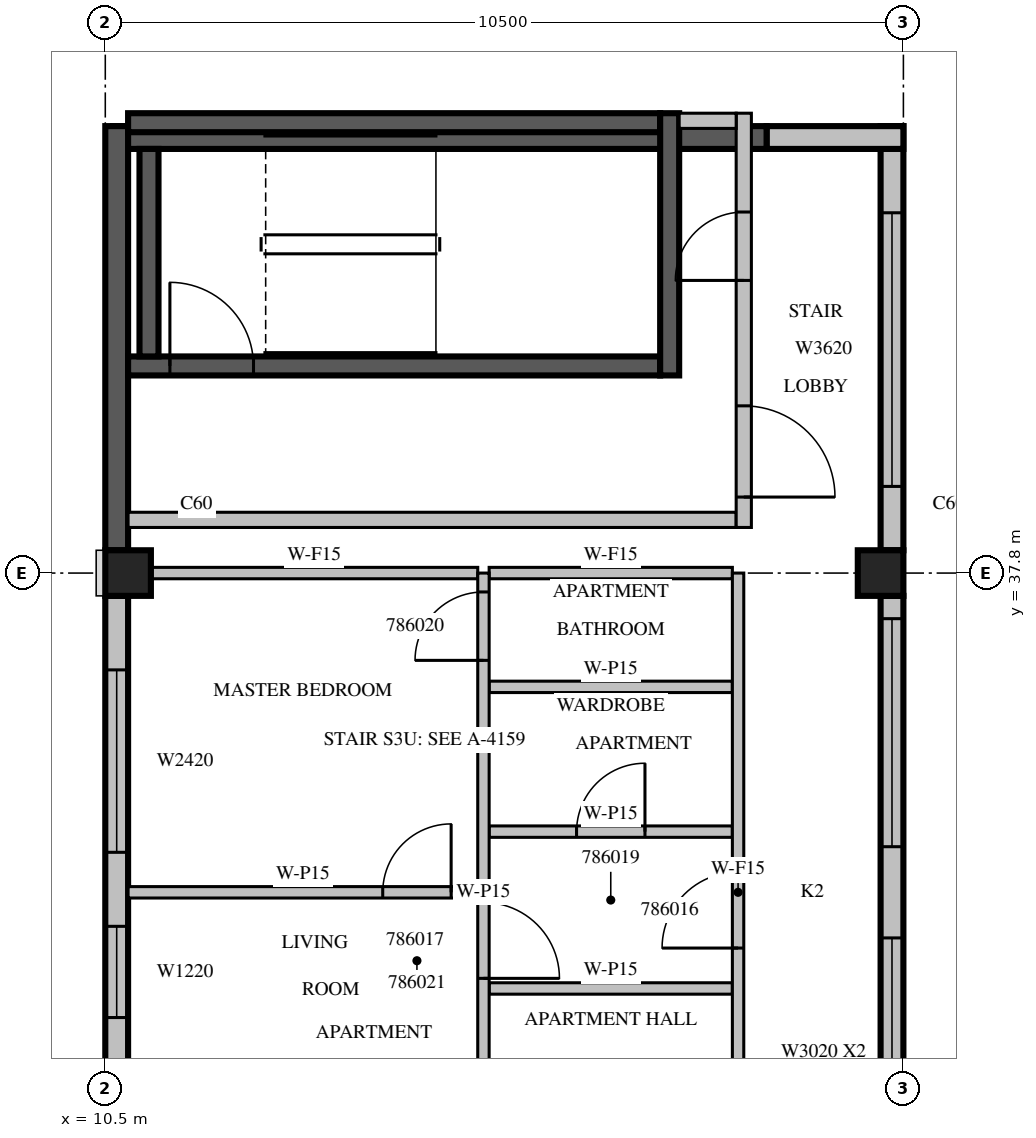
"""IFC4 building model, lengths in metres.
Left out: names, types, materials, properties, quantities, classifications, styles, units other than length and angle.
Written with IfcOpenShell. Run it as: python <this file> out.ifc"""

import sys

from ifc_helpers import new_model, si_unit, direction, frame, frame_2d, origin, origin_2d, place, context, subcontext, project, spatial, rectangle, extrude, source, transform, mapped, element, fill, save


model = new_model("IFC4")
c1 = context("Model", 3, precision=1e-05, world=origin(), true_north=direction((0.0, 1.0)))
c2 = subcontext(c1, "Body", "Model", "MODEL_VIEW")
j1 = project(units=[si_unit("LENGTHUNIT", "METRE"), si_unit("PLANEANGLEUNIT", "RADIAN")], contexts=[c1])
p1 = place(None, origin())
s1 = spatial("IfcSite", under=j1, at=p1, CompositionType="ELEMENT")
p2 = place(p1, origin())
s2 = spatial("IfcBuilding", under=s1, at=p2, CompositionType="ELEMENT")
p3 = place(p2, frame((0.0, 0.0, 361.5)))
s3 = spatial("IfcBuildingStorey", under=s2, at=p3, CompositionType="ELEMENT", Elevation=361.5)
m1 = source(origin(), c2, "Body", "SweptSolid", [
    extrude(rectangle(XDim=0.6, YDim=0.6, at=origin_2d()), origin(), (0.0, 0.0, 1.0), 3.5),
])
for number, where, z_axis, x_axis in (
    (1, (10.8, 37.8, 0.0), (0.0, 0.0, 1.0), (1.0, 0.0, 0.0)),
    (2, (20.7, 37.8, 0.0), (0.0, 0.0, 1.0), (1.0, 0.0, 0.0)),
):
    element("IfcColumn", number, at=place(p3, frame(where, z_axis=z_axis, x_axis=x_axis)), inside=s3, PredefinedType="COLUMN", context=c2, shape_type="MappedRepresentation", body=[
        mapped(m1, transform((0.0, 0.0, 0.0), scale=1.0)),
    ])
m2 = source(origin(), c2, "Body", "SweptSolid", [
    extrude(rectangle(XDim=7.8, YDim=0.3, at=frame_2d((3.9, 0.0))), origin(), (0.0, 0.0, 1.0), 3.1),
])
p4 = place(p3, frame((20.85, 29.7, 0.0), z_axis=(0.0, 0.0, 1.0), x_axis=(0.0, 1.0, 0.0)))
e3 = element("IfcWall", 3, at=p4, inside=s3, PredefinedType="STANDARD", context=c2, shape_type="MappedRepresentation", body=[
    mapped(m2, transform((0.0, 0.0, 0.0), scale=1.0)),
])
m3 = source(origin(), c2, "Body", "SweptSolid", [
    extrude(rectangle(XDim=3.0, YDim=2.0, at=frame_2d((1.5, 1.0))), frame((0.0, 0.16, 0.0), z_axis=(0.0, -1.0, 0.0), x_axis=(1.0, 0.0, 0.0)), (0.0, 0.0, 1.0), 0.32),
])
p5 = place(p4, frame((0.3, 0.0, 0.6)))
e4 = element("IfcOpeningElement", 4, at=p5, cuts=e3, PredefinedType="OPENING", context=c2, shape_type="MappedRepresentation", body=[
    mapped(m3, transform((0.0, 0.0, 0.0), scale=1.0)),
])
p6 = place(p4, frame((4.5, 0.0, 0.6)))
e5 = element("IfcOpeningElement", 5, at=p6, cuts=e3, PredefinedType="OPENING", context=c2, shape_type="MappedRepresentation", body=[
    mapped(m3, transform((0.0, 0.0, 0.0), scale=1.0)),
])
m4 = source(origin(), c2, "Body", "SweptSolid", [
    extrude(rectangle(XDim=5.58, YDim=0.3, at=frame_2d((2.79, 0.0))), origin(), (0.0, 0.0, 1.0), 3.1),
])
p7 = place(p3, frame((20.85, 38.1, 0.0), z_axis=(0.0, 0.0, 1.0), x_axis=(0.0, 1.0, 0.0)))
e6 = element("IfcWall", 6, at=p7, inside=s3, PredefinedType="STANDARD", context=c2, shape_type="MappedRepresentation", body=[
    mapped(m4, transform((0.0, 0.0, 0.0), scale=1.0)),
])
m5 = source(origin(), c2, "Body", "SweptSolid", [
    extrude(rectangle(XDim=3.6, YDim=2.0, at=frame_2d((1.8, 1.0))), frame((0.0, 0.16, 0.0), z_axis=(0.0, -1.0, 0.0), x_axis=(1.0, 0.0, 0.0)), (0.0, 0.0, 1.0), 0.32),
])
p8 = place(p7, frame((0.84, 0.0, 0.6)))
e7 = element("IfcOpeningElement", 7, at=p8, cuts=e6, PredefinedType="OPENING", context=c2, shape_type="MappedRepresentation", body=[
    mapped(m5, transform((0.0, 0.0, 0.0), scale=1.0)),
])
m6 = source(origin(), c2, "Body", "SweptSolid", [
    extrude(rectangle(XDim=1.8, YDim=0.3, at=frame_2d((0.9, 0.0))), origin(), (0.0, 0.0, 1.0), 3.1),
])
p9 = place(p3, frame((21.0, 43.53, 0.0), z_axis=(0.0, 0.0, 1.0), x_axis=(-1.0, 0.0, 0.0)))
e8 = element("IfcWall", 8, at=p9, inside=s3, PredefinedType="STANDARD", context=c2, shape_type="MappedRepresentation", body=[
    mapped(m6, transform((0.0, 0.0, 0.0), scale=1.0)),
])
m7 = source(origin(), c2, "Body", "SweptSolid", [
    extrude(rectangle(XDim=8.6, YDim=0.3, at=frame_2d((4.3, 0.0))), origin(), (0.0, 0.0, 1.0), 3.1),
])
p10 = place(p3, frame((19.2, 43.53, 0.0), z_axis=(0.0, 0.0, 1.0), x_axis=(-1.0, 0.0, 0.0)))
e9 = element("IfcWall", 9, at=p10, inside=s3, PredefinedType="SOLIDWALL", context=c2, shape_type="MappedRepresentation", body=[
    mapped(m7, transform((0.0, 0.0, 0.0), scale=1.0)),
])
m8 = source(origin(), c2, "Body", "SweptSolid", [
    extrude(rectangle(XDim=5.58, YDim=0.3, at=frame_2d((2.79, 0.0))), origin(), (0.0, 0.0, 1.0), 3.1),
])
p11 = place(p3, frame((10.65, 43.68, 0.0), z_axis=(0.0, 0.0, 1.0), x_axis=(0.0, -1.0, 0.0)))
e10 = element("IfcWall", 10, at=p11, inside=s3, PredefinedType="SOLIDWALL", context=c2, shape_type="MappedRepresentation", body=[
    mapped(m8, transform((0.0, 0.0, 0.0), scale=1.0)),
])
m9 = source(origin(), c2, "Body", "SweptSolid", [
    extrude(rectangle(XDim=6.42, YDim=0.3, at=frame_2d((3.21, 0.0))), origin(), (0.0, 0.0, 1.0), 3.1),
])
p12 = place(p3, frame((10.65, 37.5, 0.0), z_axis=(0.0, 0.0, 1.0), x_axis=(0.0, -1.0, 0.0)))
e11 = element("IfcWall", 11, at=p12, inside=s3, PredefinedType="STANDARD", context=c2, shape_type="MappedRepresentation", body=[
    mapped(m9, transform((0.0, 0.0, 0.0), scale=1.0)),
])
m10 = source(origin(), c2, "Body", "SweptSolid", [
    extrude(rectangle(XDim=1.2, YDim=2.0, at=frame_2d((0.6, 1.0))), frame((0.0, 0.16, 0.0), z_axis=(0.0, -1.0, 0.0), x_axis=(1.0, 0.0, 0.0)), (0.0, 0.0, 1.0), 0.32),
])
p13 = place(p12, frame((4.348, 0.0, 0.6)))
e12 = element("IfcOpeningElement", 12, at=p13, cuts=e11, PredefinedType="OPENING", context=c2, shape_type="MappedRepresentation", body=[
    mapped(m10, transform((0.0, 0.0, 0.0), scale=1.0)),
])
m11 = source(origin(), c2, "Body", "SweptSolid", [
    extrude(rectangle(XDim=2.4, YDim=2.0, at=frame_2d((1.2, 1.0))), frame((0.0, 0.16, 0.0), z_axis=(0.0, -1.0, 0.0), x_axis=(1.0, 0.0, 0.0)), (0.0, 0.0, 1.0), 0.32),
])
p14 = place(p12, frame((0.974, 0.0, 0.6)))
e13 = element("IfcOpeningElement", 13, at=p14, cuts=e11, PredefinedType="OPENING", context=c2, shape_type="MappedRepresentation", body=[
    mapped(m11, transform((0.0, 0.0, 0.0), scale=1.0)),
])
m12 = source(origin(), c2, "Body", "SweptSolid", [
    extrude(rectangle(XDim=7.0, YDim=0.25, at=frame_2d((3.5, 0.0))), origin(), (0.0, 0.0, 1.0), 3.1),
])
p15 = place(p3, frame((10.8, 40.525, 0.0), z_axis=(0.0, 0.0, 1.0), x_axis=(1.0, 0.0, 0.0)))
e14 = element("IfcWall", 14, at=p15, inside=s3, PredefinedType="SOLIDWALL", context=c2, shape_type="MappedRepresentation", body=[
    mapped(m12, transform((0.0, 0.0, 0.0), scale=1.0)),
])
m13 = source(origin(), c2, "Body", "SweptSolid", [
    extrude(rectangle(XDim=1.1, YDim=2.1, at=frame_2d((0.55, 1.05))), frame((0.0, 0.135, 0.0), z_axis=(0.0, -1.0, 0.0), x_axis=(1.0, 0.0, 0.0)), (0.0, 0.0, 1.0), 0.27),
])
p16 = place(p15, frame((0.55, 0.0, 0.0)))
e15 = element("IfcOpeningElement", 15, at=p16, cuts=e14, PredefinedType="OPENING", context=c2, shape_type="MappedRepresentation", body=[
    mapped(m13, transform((0.0, 0.0, 0.0), scale=1.0)),
])
p17 = place(p3, frame((10.8, 43.725, 0.0), z_axis=(0.0, 0.0, 1.0), x_axis=(1.0, 0.0, 0.0)))
e16 = element("IfcWall", 16, at=p17, inside=s3, PredefinedType="SOLIDWALL", context=c2, shape_type="MappedRepresentation", body=[
    mapped(m12, transform((0.0, 0.0, 0.0), scale=1.0)),
])
m14 = source(origin(), c2, "Body", "SweptSolid", [
    extrude(rectangle(XDim=3.45, YDim=0.25, at=frame_2d((1.725, 0.0))), origin(), (0.0, 0.0, 1.0), 3.1),
])
p18 = place(p3, frame((17.925, 40.4, 0.0), z_axis=(0.0, 0.0, 1.0), x_axis=(0.0, 1.0, 0.0)))
e17 = element("IfcWall", 17, at=p18, inside=s3, PredefinedType="SOLIDWALL", context=c2, shape_type="MappedRepresentation", body=[
    mapped(m14, transform((0.0, 0.0, 0.0), scale=1.0)),
])
m15 = source(origin(), c2, "Body", "SweptSolid", [
    extrude(rectangle(XDim=2.73, YDim=0.25, at=frame_2d((1.365, 0.0))), origin(), (0.0, 0.0, 1.0), 3.1),
])
p19 = place(p3, frame((11.075, 40.65, 0.0), z_axis=(0.0, 0.0, 1.0), x_axis=(0.0, 1.0, 0.0)))
e18 = element("IfcWall", 18, at=p19, inside=s3, PredefinedType="SOLIDWALL", context=c2, shape_type="MappedRepresentation", body=[
    mapped(m15, transform((0.0, 0.0, 0.0), scale=1.0)),
])
m16 = source(origin(), c2, "Body", "SweptSolid", [
    extrude(rectangle(XDim=8.0, YDim=0.2, at=frame_2d((4.0, 0.0))), origin(), (0.0, 0.0, 1.0), 3.1),
])
p20 = place(p3, frame((10.8, 38.5, 0.0), z_axis=(0.0, 0.0, 1.0), x_axis=(1.0, 0.0, 0.0)))
e19 = element("IfcWall", 19, at=p20, inside=s3, PredefinedType="PARTITIONING", context=c2, shape_type="MappedRepresentation", body=[
    mapped(m16, transform((0.0, 0.0, 0.0), scale=1.0)),
])
m17 = source(origin(), c2, "Body", "SweptSolid", [
    extrude(rectangle(XDim=5.45, YDim=0.2, at=frame_2d((2.725, 0.0))), origin(), (0.0, 0.0, 1.0), 3.1),
])
p21 = place(p3, frame((18.9, 38.4, 0.0), z_axis=(0.0, 0.0, 1.0), x_axis=(0.0, 1.0, 0.0)))
e20 = element("IfcWall", 20, at=p21, inside=s3, PredefinedType="PARTITIONING", context=c2, shape_type="MappedRepresentation", body=[
    mapped(m17, transform((0.0, 0.0, 0.0), scale=1.0)),
])
m18 = source(origin(), c2, "Body", "SweptSolid", [
    extrude(rectangle(XDim=1.2, YDim=2.1, at=frame_2d((0.6, 1.05))), frame((0.0, 0.11, 0.0), z_axis=(0.0, -1.0, 0.0), x_axis=(1.0, 0.0, 0.0)), (0.0, 0.0, 1.0), 0.22),
])
p22 = place(p21, frame((0.4, 0.0, 0.0)))
e21 = element("IfcOpeningElement", 21, at=p22, cuts=e20, PredefinedType="OPENING", context=c2, shape_type="MappedRepresentation", body=[
    mapped(m18, transform((0.0, 0.0, 0.0), scale=1.0)),
])
m19 = source(origin(), c2, "Body", "SweptSolid", [
    extrude(rectangle(XDim=0.9, YDim=2.1, at=frame_2d((0.45, 1.05))), frame((0.0, 0.11, 0.0), z_axis=(0.0, -1.0, 0.0), x_axis=(1.0, 0.0, 0.0)), (0.0, 0.0, 1.0), 0.22),
])
p23 = place(p21, frame((3.25, 0.0, 0.0)))
e22 = element("IfcOpeningElement", 22, at=p23, cuts=e20, PredefinedType="OPENING", context=c2, shape_type="MappedRepresentation", body=[
    mapped(m19, transform((0.0, 0.0, 0.0), scale=1.0)),
])
m20 = source(origin(), c2, "Body", "SweptSolid", [
    extrude(rectangle(XDim=0.75, YDim=0.2, at=frame_2d((0.375, 0.0))), origin(), (0.0, 0.0, 1.0), 3.1),
])
p24 = place(p3, frame((18.05, 43.75, 0.0), z_axis=(0.0, 0.0, 1.0), x_axis=(1.0, 0.0, 0.0)))
e23 = element("IfcWall", 23, at=p24, inside=s3, PredefinedType="PARTITIONING", context=c2, shape_type="MappedRepresentation", body=[
    mapped(m20, transform((0.0, 0.0, 0.0), scale=1.0)),
])
m21 = source(origin(), c2, "Body", "SweptSolid", [
    extrude(rectangle(XDim=4.6, YDim=0.15, at=frame_2d((2.3, 0.0))), origin(), (0.0, 0.0, 1.0), 3.1),
])
p25 = place(p3, frame((15.4, 33.6, 0.0), z_axis=(0.0, 0.0, 1.0), x_axis=(-1.0, 0.0, 0.0)))
e24 = element("IfcWall", 24, at=p25, inside=s3, PredefinedType="PARTITIONING", context=c2, shape_type="MappedRepresentation", body=[
    mapped(m21, transform((0.0, 0.0, 0.0), scale=1.0)),
])
m22 = source(origin(), c2, "Body", "SweptSolid", [
    extrude(rectangle(XDim=0.9, YDim=2.1, at=frame_2d((0.45, 1.05))), frame((0.0, 0.085, 0.0), z_axis=(0.0, -1.0, 0.0), x_axis=(1.0, 0.0, 0.0)), (0.0, 0.0, 1.0), 0.17),
])
p26 = place(p25, frame((0.35, 0.0, 0.0)))
e25 = element("IfcOpeningElement", 25, at=p26, cuts=e24, PredefinedType="OPENING", context=c2, shape_type="MappedRepresentation", body=[
    mapped(m22, transform((0.0, 0.0, 0.0), scale=1.0)),
])
m23 = source(origin(), c2, "Body", "SweptSolid", [
    extrude(rectangle(XDim=3.2, YDim=0.15, at=frame_2d((1.6, 0.0))), origin(), (0.0, 0.0, 1.0), 3.1),
])
p27 = place(p3, frame((18.75, 32.335, 0.0), z_axis=(0.0, 0.0, 1.0), x_axis=(-1.0, 0.0, 0.0)))
e26 = element("IfcWall", 26, at=p27, inside=s3, PredefinedType="PARTITIONING", context=c2, shape_type="MappedRepresentation", body=[
    mapped(m23, transform((0.0, 0.0, 0.0), scale=1.0)),
])
p28 = place(p3, frame((18.75, 34.398, 0.0), z_axis=(0.0, 0.0, 1.0), x_axis=(-1.0, 0.0, 0.0)))
e27 = element("IfcWall", 27, at=p28, inside=s3, PredefinedType="PARTITIONING", context=c2, shape_type="MappedRepresentation", body=[
    mapped(m23, transform((0.0, 0.0, 0.0), scale=1.0)),
])
p29 = place(p28, frame((1.15, 0.0, 0.0)))
e28 = element("IfcOpeningElement", 28, at=p29, cuts=e27, PredefinedType="OPENING", context=c2, shape_type="MappedRepresentation", body=[
    mapped(m22, transform((0.0, 0.0, 0.0), scale=1.0)),
])
p30 = place(p3, frame((18.75, 36.303, 0.0), z_axis=(0.0, 0.0, 1.0), x_axis=(-1.0, 0.0, 0.0)))
e29 = element("IfcWall", 29, at=p30, inside=s3, PredefinedType="PARTITIONING", context=c2, shape_type="MappedRepresentation", body=[
    mapped(m23, transform((0.0, 0.0, 0.0), scale=1.0)),
])
m24 = source(origin(), c2, "Body", "SweptSolid", [
    extrude(rectangle(XDim=4.301, YDim=0.15, at=frame_2d((2.151, 0.0))), origin(), (0.0, 0.0, 1.0), 3.1),
])
p31 = place(p3, frame((15.4, 37.8, 0.0), z_axis=(0.0, 0.0, 1.0), x_axis=(-1.0, 0.0, 0.0)))
e30 = element("IfcWall", 30, at=p31, inside=s3, PredefinedType="PARTITIONING", context=c2, shape_type="MappedRepresentation", body=[
    mapped(m24, transform((0.0, 0.0, 0.0), scale=1.0)),
])
p32 = place(p3, frame((18.75, 37.8, 0.0), z_axis=(0.0, 0.0, 1.0), x_axis=(-1.0, 0.0, 0.0)))
e31 = element("IfcWall", 31, at=p32, inside=s3, PredefinedType="PARTITIONING", context=c2, shape_type="MappedRepresentation", body=[
    mapped(m23, transform((0.0, 0.0, 0.0), scale=1.0)),
])
m25 = source(origin(), c2, "Body", "SweptSolid", [
    extrude(rectangle(XDim=8.4, YDim=0.15, at=frame_2d((4.2, 0.0))), origin(), (0.0, 0.0, 1.0), 3.1),
])
p33 = place(p3, frame((15.475, 29.4, 0.0), z_axis=(0.0, 0.0, 1.0), x_axis=(0.0, 1.0, 0.0)))
e32 = element("IfcWall", 32, at=p33, inside=s3, PredefinedType="PARTITIONING", context=c2, shape_type="MappedRepresentation", body=[
    mapped(m25, transform((0.0, 0.0, 0.0), scale=1.0)),
])
m26 = source(origin(), c2, "Body", "SweptSolid", [
    extrude(rectangle(XDim=1.0, YDim=2.1, at=frame_2d((0.5, 1.05))), frame((0.0, 0.085, 0.0), z_axis=(0.0, -1.0, 0.0), x_axis=(1.0, 0.0, 0.0)), (0.0, 0.0, 1.0), 0.17),
])
p34 = place(p33, frame((3.068, 0.0, 0.0)))
e33 = element("IfcOpeningElement", 33, at=p34, cuts=e32, PredefinedType="OPENING", context=c2, shape_type="MappedRepresentation", body=[
    mapped(m26, transform((0.0, 0.0, 0.0), scale=1.0)),
])
p35 = place(p33, frame((1.067, 0.0, 0.0)))
e34 = element("IfcOpeningElement", 34, at=p35, cuts=e32, PredefinedType="OPENING", context=c2, shape_type="MappedRepresentation", body=[
    mapped(m22, transform((0.0, 0.0, 0.0), scale=1.0)),
])
p36 = place(p33, frame((7.252, 0.0, 0.0)))
e35 = element("IfcOpeningElement", 35, at=p36, cuts=e32, PredefinedType="OPENING", context=c2, shape_type="MappedRepresentation", body=[
    mapped(m22, transform((0.0, 0.0, 0.0), scale=1.0)),
])
p37 = place(p3, frame((18.825, 29.4, 0.0), z_axis=(0.0, 0.0, 1.0), x_axis=(0.0, 1.0, 0.0)))
e36 = element("IfcWall", 36, at=p37, inside=s3, PredefinedType="PARTITIONING", context=c2, shape_type="MappedRepresentation", body=[
    mapped(m25, transform((0.0, 0.0, 0.0), scale=1.0)),
])
p38 = place(p37, frame((3.467, 0.0, 0.0)))
e37 = element("IfcOpeningElement", 37, at=p38, cuts=e36, PredefinedType="OPENING", context=c2, shape_type="MappedRepresentation", body=[
    mapped(m26, transform((0.0, 0.0, 0.0), scale=1.0)),
])
m27 = source(origin(), c2, "Body", "SweptSolid", [
    extrude(rectangle(XDim=3.0, YDim=2.0, at=frame_2d((1.5, 1.0))), frame((0.0, 0.03, 0.0), z_axis=(0.0, -1.0, 0.0), x_axis=(1.0, 0.0, 0.0)), (0.0, 0.0, 1.0), 0.06),
])
p39 = place(p5, origin())
e38 = element("IfcWindow", 38, at=p39, inside=s3, PartitioningType="SINGLE_PANEL", PredefinedType="WINDOW", context=c2, shape_type="MappedRepresentation", body=[
    mapped(m27, transform((0.0, 0.0, 0.0), scale=1.0)),
])
fill(e4, e38)
p40 = place(p6, origin())
e39 = element("IfcWindow", 39, at=p40, inside=s3, PartitioningType="SINGLE_PANEL", PredefinedType="WINDOW", context=c2, shape_type="MappedRepresentation", body=[
    mapped(m27, transform((0.0, 0.0, 0.0), scale=1.0)),
])
fill(e5, e39)
m28 = source(origin(), c2, "Body", "SweptSolid", [
    extrude(rectangle(XDim=3.6, YDim=2.0, at=frame_2d((1.8, 1.0))), frame((0.0, 0.03, 0.0), z_axis=(0.0, -1.0, 0.0), x_axis=(1.0, 0.0, 0.0)), (0.0, 0.0, 1.0), 0.06),
])
p41 = place(p8, origin())
e40 = element("IfcWindow", 40, at=p41, inside=s3, PartitioningType="SINGLE_PANEL", PredefinedType="WINDOW", context=c2, shape_type="MappedRepresentation", body=[
    mapped(m28, transform((0.0, 0.0, 0.0), scale=1.0)),
])
fill(e7, e40)
m29 = source(origin(), c2, "Body", "SweptSolid", [
    extrude(rectangle(XDim=1.2, YDim=2.0, at=frame_2d((0.6, 1.0))), frame((0.0, 0.03, 0.0), z_axis=(0.0, -1.0, 0.0), x_axis=(1.0, 0.0, 0.0)), (0.0, 0.0, 1.0), 0.06),
])
p42 = place(p13, origin())
e41 = element("IfcWindow", 41, at=p42, inside=s3, PartitioningType="SINGLE_PANEL", PredefinedType="WINDOW", context=c2, shape_type="MappedRepresentation", body=[
    mapped(m29, transform((0.0, 0.0, 0.0), scale=1.0)),
])
fill(e12, e41)
m30 = source(origin(), c2, "Body", "SweptSolid", [
    extrude(rectangle(XDim=2.4, YDim=2.0, at=frame_2d((1.2, 1.0))), frame((0.0, 0.03, 0.0), z_axis=(0.0, -1.0, 0.0), x_axis=(1.0, 0.0, 0.0)), (0.0, 0.0, 1.0), 0.06),
])
p43 = place(p14, origin())
e42 = element("IfcWindow", 42, at=p43, inside=s3, PartitioningType="SINGLE_PANEL", PredefinedType="WINDOW", context=c2, shape_type="MappedRepresentation", body=[
    mapped(m30, transform((0.0, 0.0, 0.0), scale=1.0)),
])
fill(e13, e42)
m31 = source(origin(), c2, "Body", "SweptSolid", [
    extrude(rectangle(XDim=1.1, YDim=2.1, at=frame_2d((0.55, 1.05))), frame((0.0, 0.025, 0.0), z_axis=(0.0, -1.0, 0.0), x_axis=(1.0, 0.0, 0.0)), (0.0, 0.0, 1.0), 0.05),
])
p44 = place(p16, origin())
e43 = element("IfcDoor", 43, at=p44, inside=s3, OperationType="SINGLE_SWING_LEFT", PredefinedType="DOOR", context=c2, shape_type="MappedRepresentation", body=[
    mapped(m31, transform((0.0, 0.0, 0.0), scale=1.0)),
])
fill(e15, e43)
m32 = source(origin(), c2, "Body", "SweptSolid", [
    extrude(rectangle(XDim=1.2, YDim=2.1, at=frame_2d((0.6, 1.05))), frame((0.0, 0.025, 0.0), z_axis=(0.0, -1.0, 0.0), x_axis=(1.0, 0.0, 0.0)), (0.0, 0.0, 1.0), 0.05),
])
p45 = place(p22, origin())
e44 = element("IfcDoor", 44, at=p45, inside=s3, OperationType="SINGLE_SWING_RIGHT", PredefinedType="DOOR", context=c2, shape_type="MappedRepresentation", body=[
    mapped(m32, transform((0.0, 0.0, 0.0), scale=1.0)),
])
fill(e21, e44)
m33 = source(origin(), c2, "Body", "SweptSolid", [
    extrude(rectangle(XDim=0.9, YDim=2.1, at=frame_2d((0.45, 1.05))), frame((0.0, 0.025, 0.0), z_axis=(0.0, -1.0, 0.0), x_axis=(1.0, 0.0, 0.0)), (0.0, 0.0, 1.0), 0.05),
])
p46 = place(p23, origin())
e45 = element("IfcDoor", 45, at=p46, inside=s3, OperationType="SINGLE_SWING_LEFT", PredefinedType="DOOR", context=c2, shape_type="MappedRepresentation", body=[
    mapped(m33, transform((0.0, 0.0, 0.0), scale=1.0)),
])
fill(e22, e45)
m34 = source(origin(), c2, "Body", "SweptSolid", [
    extrude(rectangle(XDim=1.0, YDim=2.1, at=frame_2d((0.5, 1.05))), frame((0.0, 0.025, 0.0), z_axis=(0.0, -1.0, 0.0), x_axis=(1.0, 0.0, 0.0)), (0.0, 0.0, 1.0), 0.05),
])
p47 = place(p38, origin())
e46 = element("IfcDoor", 46, at=p47, inside=s3, OperationType="SINGLE_SWING_LEFT", PredefinedType="DOOR", context=c2, shape_type="MappedRepresentation", body=[
    mapped(m34, transform((0.0, 0.0, 0.0), scale=1.0)),
])
fill(e37, e46)
p48 = place(p34, origin())
e47 = element("IfcDoor", 47, at=p48, inside=s3, OperationType="SINGLE_SWING_RIGHT", PredefinedType="DOOR", context=c2, shape_type="MappedRepresentation", body=[
    mapped(m34, transform((0.0, 0.0, 0.0), scale=1.0)),
])
fill(e33, e47)
p49 = place(p29, origin())
e48 = element("IfcDoor", 48, at=p49, inside=s3, OperationType="SINGLE_SWING_RIGHT", PredefinedType="DOOR", context=c2, shape_type="MappedRepresentation", body=[
    mapped(m33, transform((0.0, 0.0, 0.0), scale=1.0)),
])
fill(e28, e48)
p50 = place(p36, origin())
e49 = element("IfcDoor", 49, at=p50, inside=s3, OperationType="SINGLE_SWING_LEFT", PredefinedType="DOOR", context=c2, shape_type="MappedRepresentation", body=[
    mapped(m33, transform((0.0, 0.0, 0.0), scale=1.0)),
])
fill(e35, e49)
p51 = place(p26, origin())
e50 = element("IfcDoor", 50, at=p51, inside=s3, OperationType="SINGLE_SWING_RIGHT", PredefinedType="DOOR", context=c2, shape_type="MappedRepresentation", body=[
    mapped(m33, transform((0.0, 0.0, 0.0), scale=1.0)),
])
fill(e25, e50)
save(model, sys.argv[1])
